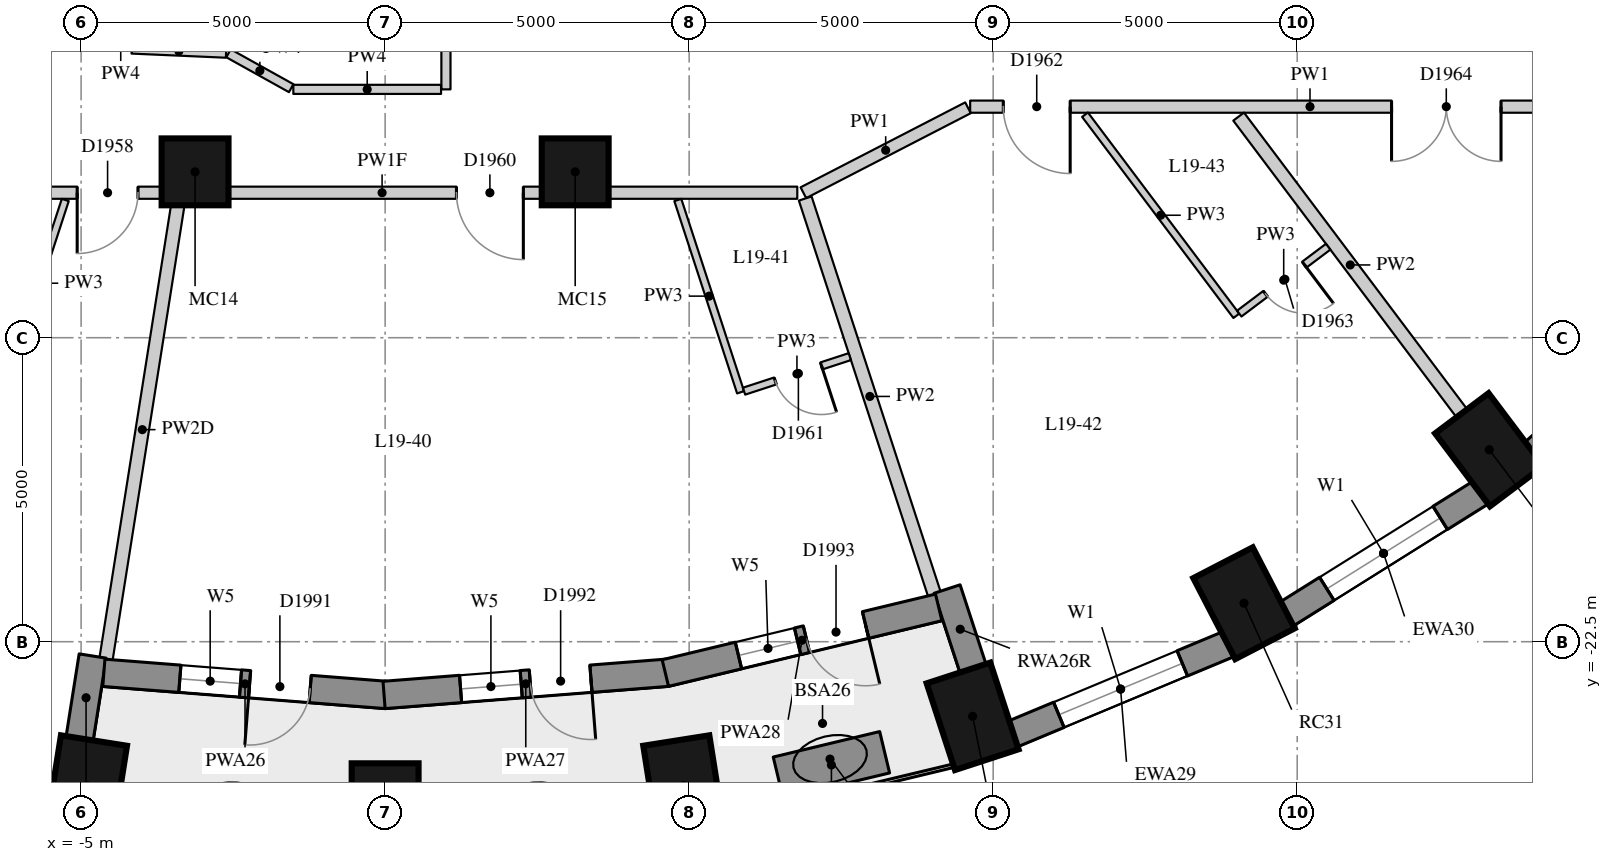
"""IFC4 building model, lengths in metres.
Left out: names, types, materials, properties, quantities, classifications, styles, units other than length and angle.
Written with IfcOpenShell. Run it as: python <this file> out.ifc"""

import sys

from ifc_helpers import new_model, si_unit, direction, frame, frame_2d, origin, origin_2d, place, context, subcontext, project, spatial, rectangle, extrude, element, fill, save


model = new_model("IFC4")
c1 = context("Model", 3, precision=1e-05, world=origin(), true_north=direction((0.0, 1.0)))
c2 = subcontext(c1, "Body", "Model", "MODEL_VIEW")
j1 = project(units=[si_unit("LENGTHUNIT", "METRE"), si_unit("PLANEANGLEUNIT", "RADIAN")], contexts=[c1])
p1 = place(None, origin())
s1 = spatial("IfcSite", under=j1, at=p1, CompositionType="ELEMENT")
p2 = place(p1, origin())
s2 = spatial("IfcBuilding", under=s1, at=p2, CompositionType="ELEMENT")
p3 = place(p2, frame((0.0, 0.0, 71.2)))
s3 = spatial("IfcBuildingStorey", under=s2, at=p3, CompositionType="ELEMENT", Elevation=71.2)
for number, where, z_axis, x_axis in (
    (1, (-4.906, -24.866, 0.0), (0.0, 0.0, 1.0), (-0.156, -0.988, 0.0)),
    (2, (0.0, -25.25, 0.0), (0.0, 0.0, 1.0), (0.0, -1.0, 0.0)),
    (3, (4.906, -24.866, 0.0), (0.0, 0.0, 1.0), (0.156, -0.988, 0.0)),
    (4, (9.662, -23.727, 0.0), (0.0, 0.0, 1.0), (0.31, -0.951, 0.0)),
    (5, (14.125, -21.867, 0.0), (0.0, 0.0, 1.0), (0.46, -0.888, 0.0)),
    (6, (18.159, -19.343, 0.0), (0.0, 0.0, 1.0), (0.601, -0.799, 0.0)),
):
    element("IfcColumn", number, at=place(p3, frame(where, z_axis=z_axis, x_axis=x_axis)), inside=s3, PredefinedType="COLUMN", context=c2, shape_type="SweptSolid", body=[
        extrude(rectangle(XDim=1.5, YDim=1.1, at=origin_2d()), origin(), (0.0, 0.0, 1.0), 3.3),
    ])
for number, where, z_axis, x_axis in (
    (7, (-3.126, -14.772, 0.0), (0.0, 0.0, 1.0), (1.0, 0.0, 0.0)),
    (8, (3.126, -14.772, 0.0), (0.0, 0.0, 1.0), (1.0, 0.0, 0.0)),
):
    element("IfcColumn", number, at=place(p3, frame(where, z_axis=z_axis, x_axis=x_axis)), inside=s3, PredefinedType="COLUMN", context=c2, shape_type="SweptSolid", body=[
        extrude(rectangle(XDim=1.1, YDim=1.1, at=origin_2d()), origin(), (0.0, 0.0, 1.0), 3.3),
    ])
p4 = place(p3, frame((-9.308, -24.35, 0.0), z_axis=(0.0, 0.0, 1.0), x_axis=(0.972496561493, -0.232917233979, 0.0)))
e9 = element("IfcWall", 9, at=p4, inside=s3, PredefinedType="SOLIDWALL", context=c2, shape_type="SweptSolid", body=[
    extrude(rectangle(XDim=3.911, YDim=0.45, at=frame_2d((1.956, 0.0))), origin(), (0.0, 0.0, 1.0), 3.02),
])
p5 = place(p4, frame((0.855, 0.0, 0.4)))
e10 = element("IfcOpeningElement", 10, at=p5, cuts=e9, PredefinedType="OPENING", context=c2, shape_type="SweptSolid", body=[
    extrude(rectangle(XDim=2.2, YDim=1.75, at=frame_2d((1.1, 0.875))), frame((0.0, 0.235, 0.0), z_axis=(0.0, -1.0, 0.0), x_axis=(1.0, 0.0, 0.0)), (0.0, 0.0, 1.0), 0.47),
])
p6 = place(p3, frame((10.315, -24.021, 0.0), z_axis=(0.0, 0.0, 1.0), x_axis=(0.923031964282, 0.384723267966, 0.0)))
e11 = element("IfcWall", 11, at=p6, inside=s3, PredefinedType="SOLIDWALL", context=c2, shape_type="SweptSolid", body=[
    extrude(rectangle(XDim=3.856, YDim=0.45, at=frame_2d((1.928, 0.0))), origin(), (0.0, 0.0, 1.0), 3.02),
])
p7 = place(p6, frame((0.828, 0.0, 0.4)))
e12 = element("IfcOpeningElement", 12, at=p7, cuts=e11, PredefinedType="OPENING", context=c2, shape_type="SweptSolid", body=[
    extrude(rectangle(XDim=2.2, YDim=1.75, at=frame_2d((1.1, 0.875))), frame((0.0, 0.235, 0.0), z_axis=(0.0, -1.0, 0.0), x_axis=(1.0, 0.0, 0.0)), (0.0, 0.0, 1.0), 0.47),
])
p8 = place(p3, frame((14.817, -22.051, 0.0), z_axis=(0.0, 0.0, 1.0), x_axis=(0.847635480093, 0.530579016629, 0.0)))
e13 = element("IfcWall", 13, at=p8, inside=s3, PredefinedType="SOLIDWALL", context=c2, shape_type="SweptSolid", body=[
    extrude(rectangle(XDim=3.782, YDim=0.45, at=frame_2d((1.891, 0.0))), origin(), (0.0, 0.0, 1.0), 3.02),
])
p9 = place(p8, frame((0.791, 0.0, 0.4)))
e14 = element("IfcOpeningElement", 14, at=p9, cuts=e13, PredefinedType="OPENING", context=c2, shape_type="SweptSolid", body=[
    extrude(rectangle(XDim=2.2, YDim=1.75, at=frame_2d((1.1, 0.875))), frame((0.0, 0.235, 0.0), z_axis=(0.0, -1.0, 0.0), x_axis=(1.0, 0.0, 0.0)), (0.0, 0.0, 1.0), 0.47),
])
p10 = place(p3, frame((18.871, -19.407, 0.0), z_axis=(0.0, 0.0, 1.0), x_axis=(0.745526233716, 0.66647628228, 0.0)))
e15 = element("IfcWall", 15, at=p10, inside=s3, PredefinedType="SOLIDWALL", context=c2, shape_type="SweptSolid", body=[
    extrude(rectangle(XDim=3.697, YDim=0.45, at=frame_2d((1.848, 0.0))), origin(), (0.0, 0.0, 1.0), 3.02),
])
p11 = place(p3, frame((-5.027, -24.108, 0.0), z_axis=(0.0, 0.0, 1.0), x_axis=(0.156133927791, 0.98773589415, 0.0)))
e16 = element("IfcWall", 16, at=p11, inside=s3, PredefinedType="SOLIDWALL", context=c2, shape_type="SweptSolid", body=[
    extrude(rectangle(XDim=1.39, YDim=0.45, at=frame_2d((0.695, 0.0))), origin(), (0.0, 0.0, 1.0), 2.47),
])
p12 = place(p3, frame((9.674, -22.956, 0.0), z_axis=(0.0, 0.0, 1.0), x_axis=(-0.310269011655, 0.950648799719, 0.0)))
e17 = element("IfcWall", 17, at=p12, inside=s3, PredefinedType="SOLIDWALL", context=c2, shape_type="SweptSolid", body=[
    extrude(rectangle(XDim=1.39, YDim=0.45, at=frame_2d((0.695, 0.0))), origin(), (0.0, 0.0, 1.0), 3.02),
])
p13 = place(p3, frame((-4.626, -23.011, 0.0), z_axis=(0.0, 0.0, 1.0), x_axis=(0.996937095772, -0.078207589615, 0.0)))
e18 = element("IfcWall", 18, at=p13, inside=s3, PredefinedType="SOLIDWALL", context=c2, shape_type="SweptSolid", body=[
    extrude(rectangle(XDim=4.657, YDim=0.45, at=frame_2d((2.329, 0.0))), origin(), (0.0, 0.0, 1.0), 3.02),
])
p14 = place(p13, frame((1.254, 0.0, 0.4)))
e19 = element("IfcOpeningElement", 19, at=p14, cuts=e18, PredefinedType="OPENING", context=c2, shape_type="SweptSolid", body=[
    extrude(rectangle(XDim=1.0, YDim=1.75, at=frame_2d((0.5, 0.875))), frame((0.0, 0.235, 0.0), z_axis=(0.0, -1.0, 0.0), x_axis=(1.0, 0.0, 0.0)), (0.0, 0.0, 1.0), 0.47),
])
p15 = place(p13, frame((2.404, 0.0, 0.0)))
e20 = element("IfcOpeningElement", 20, at=p15, cuts=e18, PredefinedType="OPENING", context=c2, shape_type="SweptSolid", body=[
    extrude(rectangle(XDim=1.0, YDim=2.15, at=frame_2d((0.5, 1.075))), frame((0.0, 0.235, 0.0), z_axis=(0.0, -1.0, 0.0), x_axis=(1.0, 0.0, 0.0)), (0.0, 0.0, 1.0), 0.47),
])
p16 = place(p3, frame((-0.018, -23.376, 0.0), z_axis=(0.0, 0.0, 1.0), x_axis=(0.996935982964, 0.078221773648, 0.0)))
e21 = element("IfcWall", 21, at=p16, inside=s3, PredefinedType="SOLIDWALL", context=c2, shape_type="SweptSolid", body=[
    extrude(rectangle(XDim=4.676, YDim=0.45, at=frame_2d((2.338, 0.0))), origin(), (0.0, 0.0, 1.0), 3.02),
])
p17 = place(p16, frame((1.263, 0.0, 0.4)))
e22 = element("IfcOpeningElement", 22, at=p17, cuts=e21, PredefinedType="OPENING", context=c2, shape_type="SweptSolid", body=[
    extrude(rectangle(XDim=1.0, YDim=1.75, at=frame_2d((0.5, 0.875))), frame((0.0, 0.235, 0.0), z_axis=(0.0, -1.0, 0.0), x_axis=(1.0, 0.0, 0.0)), (0.0, 0.0, 1.0), 0.47),
])
p18 = place(p16, frame((2.413, 0.0, 0.0)))
e23 = element("IfcOpeningElement", 23, at=p18, cuts=e21, PredefinedType="OPENING", context=c2, shape_type="SweptSolid", body=[
    extrude(rectangle(XDim=1.0, YDim=2.15, at=frame_2d((0.5, 1.075))), frame((0.0, 0.235, 0.0), z_axis=(0.0, -1.0, 0.0), x_axis=(1.0, 0.0, 0.0)), (0.0, 0.0, 1.0), 0.47),
])
p19 = place(p3, frame((4.608, -23.016, 0.0), z_axis=(0.0, 0.0, 1.0), x_axis=(0.972343667289, 0.233554688847, 0.0)))
e24 = element("IfcWall", 24, at=p19, inside=s3, PredefinedType="SOLIDWALL", context=c2, shape_type="SweptSolid", body=[
    extrude(rectangle(XDim=4.624, YDim=0.45, at=frame_2d((2.312, 0.0))), origin(), (0.0, 0.0, 1.0), 3.02),
])
p20 = place(p19, frame((1.237, 0.0, 0.4)))
e25 = element("IfcOpeningElement", 25, at=p20, cuts=e24, PredefinedType="OPENING", context=c2, shape_type="SweptSolid", body=[
    extrude(rectangle(XDim=1.0, YDim=1.75, at=frame_2d((0.5, 0.875))), frame((0.0, 0.235, 0.0), z_axis=(0.0, -1.0, 0.0), x_axis=(1.0, 0.0, 0.0)), (0.0, 0.0, 1.0), 0.47),
])
p21 = place(p19, frame((2.387, 0.0, 0.0)))
e26 = element("IfcOpeningElement", 26, at=p21, cuts=e24, PredefinedType="OPENING", context=c2, shape_type="SweptSolid", body=[
    extrude(rectangle(XDim=1.0, YDim=2.15, at=frame_2d((0.5, 1.075))), frame((0.0, 0.235, 0.0), z_axis=(0.0, -1.0, 0.0), x_axis=(1.0, 0.0, 0.0)), (0.0, 0.0, 1.0), 0.47),
])
p22 = place(p3, frame((6.465, -24.737, 0.0), z_axis=(0.0, 0.0, 1.0), x_axis=(0.972504142103, 0.232885580473, 0.0)))
e27 = element("IfcWall", 27, at=p22, inside=s3, PredefinedType="USERDEFINED", context=c2, shape_type="SweptSolid", body=[
    extrude(rectangle(XDim=1.8, YDim=0.7, at=frame_2d((0.9, 0.0))), origin(), (0.0, 0.0, 1.0), 0.75),
])
p23 = place(p3, frame((20.8, -13.7, 0.0), z_axis=(0.0, 0.0, 1.0), x_axis=(-1.0, 0.0, 0.0)))
e28 = element("IfcWall", 28, at=p23, inside=s3, PredefinedType="PARTITIONING", context=c2, shape_type="SweptSolid", body=[
    extrude(rectangle(XDim=11.178, YDim=0.2, at=frame_2d((5.589, 0.0))), origin(), (0.0, 0.0, 1.0), 3.02),
])
p24 = place(p23, frame((9.534, 0.0, 0.0)))
e29 = element("IfcOpeningElement", 29, at=p24, cuts=e28, PredefinedType="OPENING", context=c2, shape_type="SweptSolid", body=[
    extrude(rectangle(XDim=1.1, YDim=2.1, at=frame_2d((0.55, 1.05))), frame((0.0, 0.11, 0.0), z_axis=(0.0, -1.0, 0.0), x_axis=(1.0, 0.0, 0.0)), (0.0, 0.0, 1.0), 0.22),
])
p25 = place(p23, frame((2.448, 0.0, 0.0)))
e30 = element("IfcOpeningElement", 30, at=p25, cuts=e28, PredefinedType="OPENING", context=c2, shape_type="SweptSolid", body=[
    extrude(rectangle(XDim=1.8, YDim=2.1, at=frame_2d((0.9, 1.05))), frame((0.0, 0.11, 0.0), z_axis=(0.0, -1.0, 0.0), x_axis=(1.0, 0.0, 0.0)), (0.0, 0.0, 1.0), 0.22),
])
p26 = place(p3, frame((9.586, -13.719, 0.0), z_axis=(0.0, 0.0, 1.0), x_axis=(-0.888664904046, -0.458557181076, 0.0)))
e31 = element("IfcWall", 31, at=p26, inside=s3, PredefinedType="PARTITIONING", context=c2, shape_type="SweptSolid", body=[
    extrude(rectangle(XDim=3.046, YDim=0.2, at=frame_2d((1.523, 0.0))), origin(), (0.0, 0.0, 1.0), 3.02),
])
p27 = place(p3, frame((6.778, -15.115, 0.0), z_axis=(0.0, 0.0, 1.0), x_axis=(-1.0, 0.0, 0.0)))
e32 = element("IfcWall", 32, at=p27, inside=s3, PredefinedType="PARTITIONING", context=c2, shape_type="SweptSolid", body=[
    extrude(rectangle(XDim=13.657, YDim=0.2, at=frame_2d((6.828, 0.0))), origin(), (0.0, 0.0, 1.0), 2.42),
])
p28 = place(p27, frame((10.843, 0.0, 0.0)))
e33 = element("IfcOpeningElement", 33, at=p28, cuts=e32, PredefinedType="OPENING", context=c2, shape_type="SweptSolid", body=[
    extrude(rectangle(XDim=1.0, YDim=2.1, at=frame_2d((0.5, 1.05))), frame((0.0, 0.11, 0.0), z_axis=(0.0, -1.0, 0.0), x_axis=(1.0, 0.0, 0.0)), (0.0, 0.0, 1.0), 0.22),
])
p29 = place(p27, frame((4.505, 0.0, 0.0)))
e34 = element("IfcOpeningElement", 34, at=p29, cuts=e32, PredefinedType="OPENING", context=c2, shape_type="SweptSolid", body=[
    extrude(rectangle(XDim=1.1, YDim=2.1, at=frame_2d((0.55, 1.05))), frame((0.0, 0.11, 0.0), z_axis=(0.0, -1.0, 0.0), x_axis=(1.0, 0.0, 0.0)), (0.0, 0.0, 1.0), 0.22),
])
p30 = place(p3, frame((1.0, -9.23, 0.0), z_axis=(0.0, 0.0, 1.0), x_axis=(0.0, -1.0, 0.0)))
e35 = element("IfcWall", 35, at=p30, inside=s3, PredefinedType="PARTITIONING", context=c2, shape_type="SweptSolid", body=[
    extrude(rectangle(XDim=4.186, YDim=0.15, at=frame_2d((2.093, 0.0))), origin(), (0.0, 0.0, 1.0), 3.02),
])
p31 = place(p3, frame((0.92, -13.416, 0.0), z_axis=(0.0, 0.0, 1.0), x_axis=(-1.0, 0.0, 0.0)))
e36 = element("IfcWall", 36, at=p31, inside=s3, PredefinedType="PARTITIONING", context=c2, shape_type="SweptSolid", body=[
    extrude(rectangle(XDim=2.43, YDim=0.15, at=frame_2d((1.215, 0.0))), origin(), (0.0, 0.0, 1.0), 3.02),
])
p32 = place(p3, frame((-1.545, -13.396, 0.0), z_axis=(0.0, 0.0, 1.0), x_axis=(-0.873678559566, 0.486503622345, 0.0)))
e37 = element("IfcWall", 37, at=p32, inside=s3, PredefinedType="PARTITIONING", context=c2, shape_type="SweptSolid", body=[
    extrude(rectangle(XDim=1.18, YDim=0.15, at=frame_2d((0.59, 0.0))), origin(), (0.0, 0.0, 1.0), 3.02),
])
p33 = place(p3, frame((-2.616, -12.82, 0.0), z_axis=(0.0, 0.0, 1.0), x_axis=(-0.99904515517, 0.04368956318, 0.0)))
e38 = element("IfcWall", 38, at=p33, inside=s3, PredefinedType="PARTITIONING", context=c2, shape_type="SweptSolid", body=[
    extrude(rectangle(XDim=1.553, YDim=0.15, at=frame_2d((0.777, 0.0))), origin(), (0.0, 0.0, 1.0), 3.02),
])
p34 = place(p3, frame((-4.591, -22.789, 0.0), z_axis=(0.0, 0.0, 1.0), x_axis=(0.156151107863, 0.987733178299, 0.0)))
e39 = element("IfcWall", 39, at=p34, inside=s3, PredefinedType="PARTITIONING", context=c2, shape_type="SweptSolid", body=[
    extrude(rectangle(XDim=7.647, YDim=0.22, at=frame_2d((3.823, 0.0))), origin(), (0.0, 0.0, 1.0), 2.47),
])
p35 = place(p3, frame((9.034, -21.721, 0.0), z_axis=(0.0, 0.0, 1.0), x_axis=(-0.310286072156, 0.95064323141, 0.0)))
e40 = element("IfcWall", 40, at=p35, inside=s3, PredefinedType="PARTITIONING", context=c2, shape_type="SweptSolid", body=[
    extrude(rectangle(XDim=6.849, YDim=0.22, at=frame_2d((3.424, 0.0))), origin(), (0.0, 0.0, 1.0), 3.02),
])
p36 = place(p3, frame((17.708, -18.743, 0.0), z_axis=(0.0, 0.0, 1.0), x_axis=(-0.601170031872, 0.799121137738, 0.0)))
e41 = element("IfcWall", 41, at=p36, inside=s3, PredefinedType="PARTITIONING", context=c2, shape_type="SweptSolid", body=[
    extrude(rectangle(XDim=6.106, YDim=0.22, at=frame_2d((3.053, 0.0))), origin(), (0.0, 0.0, 1.0), 3.02),
])
p37 = place(p3, frame((-5.26, -15.235, 0.0), z_axis=(0.0, 0.0, 1.0), x_axis=(-0.310220453498, -0.950664646567, 0.0)))
e42 = element("IfcWall", 42, at=p37, inside=s3, PredefinedType="PARTITIONING", context=c2, shape_type="SweptSolid", body=[
    extrude(rectangle(XDim=2.88, YDim=0.12, at=frame_2d((1.44, 0.0))), origin(), (0.0, 0.0, 1.0), 3.02),
])
p38 = place(p3, frame((4.813, -15.235, 0.0), z_axis=(0.0, 0.0, 1.0), x_axis=(0.310233981264, -0.950660232086, 0.0)))
e43 = element("IfcWall", 43, at=p38, inside=s3, PredefinedType="PARTITIONING", context=c2, shape_type="SweptSolid", body=[
    extrude(rectangle(XDim=3.327, YDim=0.12, at=frame_2d((1.664, 0.0))), origin(), (0.0, 0.0, 1.0), 3.02),
])
p39 = place(p3, frame((11.51, -13.832, 0.0), z_axis=(0.0, 0.0, 1.0), x_axis=(0.60115060605, -0.7991357512, 0.0)))
e44 = element("IfcWall", 44, at=p39, inside=s3, PredefinedType="PARTITIONING", context=c2, shape_type="SweptSolid", body=[
    extrude(rectangle(XDim=4.14, YDim=0.12, at=frame_2d((2.07, 0.0))), origin(), (0.0, 0.0, 1.0), 3.02),
])
p40 = place(p3, frame((5.903, -18.379, 0.0), z_axis=(0.0, 0.0, 1.0), x_axis=(0.950626343776, 0.310337807105, 0.0)))
e45 = element("IfcWall", 45, at=p40, inside=s3, PredefinedType="PARTITIONING", context=c2, shape_type="SweptSolid", body=[
    extrude(rectangle(XDim=1.83, YDim=0.12, at=frame_2d((0.915, 0.0))), origin(), (0.0, 0.0, 1.0), 3.02),
])
p41 = place(p40, frame((0.54, 0.0, 0.0)))
e46 = element("IfcOpeningElement", 46, at=p41, cuts=e45, PredefinedType="OPENING", context=c2, shape_type="SweptSolid", body=[
    extrude(rectangle(XDim=0.8, YDim=2.1, at=frame_2d((0.4, 1.05))), frame((0.0, 0.07, 0.0), z_axis=(0.0, -1.0, 0.0), x_axis=(1.0, 0.0, 0.0)), (0.0, 0.0, 1.0), 0.14),
])
p42 = place(p3, frame((14.047, -17.104, 0.0), z_axis=(0.0, 0.0, 1.0), x_axis=(0.799182868338, 0.601087966071, 0.0)))
e47 = element("IfcWall", 47, at=p42, inside=s3, PredefinedType="PARTITIONING", context=c2, shape_type="SweptSolid", body=[
    extrude(rectangle(XDim=1.83, YDim=0.12, at=frame_2d((0.915, 0.0))), origin(), (0.0, 0.0, 1.0), 3.02),
])
p43 = place(p42, frame((0.54, 0.0, 0.0)))
e48 = element("IfcOpeningElement", 48, at=p43, cuts=e47, PredefinedType="OPENING", context=c2, shape_type="SweptSolid", body=[
    extrude(rectangle(XDim=0.8, YDim=2.1, at=frame_2d((0.4, 1.05))), frame((0.0, 0.07, 0.0), z_axis=(0.0, -1.0, 0.0), x_axis=(1.0, 0.0, 0.0)), (0.0, 0.0, 1.0), 0.14),
])
p44 = place(p7, origin())
e49 = element("IfcWindow", 49, at=p44, inside=s3, PartitioningType="SINGLE_PANEL", PredefinedType="WINDOW", context=c2, shape_type="SweptSolid", body=[
    extrude(rectangle(XDim=2.2, YDim=1.75, at=frame_2d((1.1, 0.875))), frame((0.0, 0.035, 0.0), z_axis=(0.0, -1.0, 0.0), x_axis=(1.0, 0.0, 0.0)), (0.0, 0.0, 1.0), 0.06),
])
fill(e12, e49)
p45 = place(p9, origin())
e50 = element("IfcWindow", 50, at=p45, inside=s3, PartitioningType="SINGLE_PANEL", PredefinedType="WINDOW", context=c2, shape_type="SweptSolid", body=[
    extrude(rectangle(XDim=2.2, YDim=1.75, at=frame_2d((1.1, 0.875))), frame((0.0, 0.035, 0.0), z_axis=(0.0, -1.0, 0.0), x_axis=(1.0, 0.0, 0.0)), (0.0, 0.0, 1.0), 0.06),
])
fill(e14, e50)
p46 = place(p14, origin())
e51 = element("IfcWindow", 51, at=p46, inside=s3, PartitioningType="SINGLE_PANEL", PredefinedType="WINDOW", context=c2, shape_type="SweptSolid", body=[
    extrude(rectangle(XDim=1.0, YDim=1.75, at=frame_2d((0.5, 0.875))), frame((0.0, 0.035, 0.0), z_axis=(0.0, -1.0, 0.0), x_axis=(1.0, 0.0, 0.0)), (0.0, 0.0, 1.0), 0.06),
])
fill(e19, e51)
p47 = place(p15, frame((1.0, 0.0, 0.0), z_axis=(0.0, 0.0, 1.0), x_axis=(-1.0, 0.0, 0.0)))
e52 = element("IfcDoor", 52, at=p47, inside=s3, OperationType="SINGLE_SWING_RIGHT", PredefinedType="DOOR", context=c2, shape_type="SweptSolid", body=[
    extrude(rectangle(XDim=1.0, YDim=2.15, at=frame_2d((0.5, 1.075))), frame((0.0, 0.075, 0.0), z_axis=(0.0, -1.0, 0.0), x_axis=(1.0, 0.0, 0.0)), (0.0, 0.0, 1.0), 0.05),
])
fill(e20, e52)
p48 = place(p17, origin())
e53 = element("IfcWindow", 53, at=p48, inside=s3, PartitioningType="SINGLE_PANEL", PredefinedType="WINDOW", context=c2, shape_type="SweptSolid", body=[
    extrude(rectangle(XDim=1.0, YDim=1.75, at=frame_2d((0.5, 0.875))), frame((0.0, 0.035, 0.0), z_axis=(0.0, -1.0, 0.0), x_axis=(1.0, 0.0, 0.0)), (0.0, 0.0, 1.0), 0.06),
])
fill(e22, e53)
p49 = place(p18, frame((1.0, 0.0, 0.0), z_axis=(0.0, 0.0, 1.0), x_axis=(-1.0, 0.0, 0.0)))
e54 = element("IfcDoor", 54, at=p49, inside=s3, OperationType="SINGLE_SWING_LEFT", PredefinedType="DOOR", context=c2, shape_type="SweptSolid", body=[
    extrude(rectangle(XDim=1.0, YDim=2.15, at=frame_2d((0.5, 1.075))), frame((0.0, 0.075, 0.0), z_axis=(0.0, -1.0, 0.0), x_axis=(1.0, 0.0, 0.0)), (0.0, 0.0, 1.0), 0.05),
])
fill(e23, e54)
p50 = place(p20, origin())
e55 = element("IfcWindow", 55, at=p50, inside=s3, PartitioningType="SINGLE_PANEL", PredefinedType="WINDOW", context=c2, shape_type="SweptSolid", body=[
    extrude(rectangle(XDim=1.0, YDim=1.75, at=frame_2d((0.5, 0.875))), frame((0.0, 0.035, 0.0), z_axis=(0.0, -1.0, 0.0), x_axis=(1.0, 0.0, 0.0)), (0.0, 0.0, 1.0), 0.06),
])
fill(e25, e55)
p51 = place(p21, frame((1.0, 0.0, 0.0), z_axis=(0.0, 0.0, 1.0), x_axis=(-1.0, 0.0, 0.0)))
e56 = element("IfcDoor", 56, at=p51, inside=s3, OperationType="SINGLE_SWING_LEFT", PredefinedType="DOOR", context=c2, shape_type="SweptSolid", body=[
    extrude(rectangle(XDim=1.0, YDim=2.15, at=frame_2d((0.5, 1.075))), frame((0.0, 0.075, 0.0), z_axis=(0.0, -1.0, 0.0), x_axis=(1.0, 0.0, 0.0)), (0.0, 0.0, 1.0), 0.05),
])
fill(e26, e56)
p52 = place(p28, origin())
e57 = element("IfcDoor", 57, at=p52, inside=s3, OperationType="SINGLE_SWING_RIGHT", PredefinedType="DOOR", context=c2, shape_type="SweptSolid", body=[
    extrude(rectangle(XDim=1.0, YDim=2.1, at=frame_2d((0.5, 1.05))), frame((0.0, 0.025, 0.0), z_axis=(0.0, -1.0, 0.0), x_axis=(1.0, 0.0, 0.0)), (0.0, 0.0, 1.0), 0.05),
])
fill(e33, e57)
p53 = place(p29, origin())
e58 = element("IfcDoor", 58, at=p53, inside=s3, OperationType="SINGLE_SWING_LEFT", PredefinedType="DOOR", context=c2, shape_type="SweptSolid", body=[
    extrude(rectangle(XDim=1.1, YDim=2.1, at=frame_2d((0.55, 1.05))), frame((0.0, 0.025, 0.0), z_axis=(0.0, -1.0, 0.0), x_axis=(1.0, 0.0, 0.0)), (0.0, 0.0, 1.0), 0.05),
])
fill(e34, e58)
p54 = place(p41, origin())
e59 = element("IfcDoor", 59, at=p54, inside=s3, OperationType="SINGLE_SWING_LEFT", PredefinedType="DOOR", context=c2, shape_type="SweptSolid", body=[
    extrude(rectangle(XDim=0.8, YDim=2.1, at=frame_2d((0.4, 1.05))), frame((0.0, 0.025, 0.0), z_axis=(0.0, -1.0, 0.0), x_axis=(1.0, 0.0, 0.0)), (0.0, 0.0, 1.0), 0.05),
])
fill(e46, e59)
p55 = place(p24, origin())
e60 = element("IfcDoor", 60, at=p55, inside=s3, OperationType="SINGLE_SWING_LEFT", PredefinedType="DOOR", context=c2, shape_type="SweptSolid", body=[
    extrude(rectangle(XDim=1.1, YDim=2.1, at=frame_2d((0.55, 1.05))), frame((0.0, 0.025, 0.0), z_axis=(0.0, -1.0, 0.0), x_axis=(1.0, 0.0, 0.0)), (0.0, 0.0, 1.0), 0.05),
])
fill(e29, e60)
p56 = place(p43, origin())
e61 = element("IfcDoor", 61, at=p56, inside=s3, OperationType="SINGLE_SWING_LEFT", PredefinedType="DOOR", context=c2, shape_type="SweptSolid", body=[
    extrude(rectangle(XDim=0.8, YDim=2.1, at=frame_2d((0.4, 1.05))), frame((0.0, 0.025, 0.0), z_axis=(0.0, -1.0, 0.0), x_axis=(1.0, 0.0, 0.0)), (0.0, 0.0, 1.0), 0.05),
])
fill(e48, e61)
p57 = place(p25, origin())
e62 = element("IfcDoor", 62, at=p57, inside=s3, OperationType="DOUBLE_DOOR_SINGLE_SWING", PredefinedType="DOOR", context=c2, shape_type="SweptSolid", body=[
    extrude(rectangle(XDim=1.8, YDim=2.1, at=frame_2d((0.9, 1.05))), frame((0.0, 0.025, 0.0), z_axis=(0.0, -1.0, 0.0), x_axis=(1.0, 0.0, 0.0)), (0.0, 0.0, 1.0), 0.05),
])
fill(e30, e62)
save(model, sys.argv[1])
